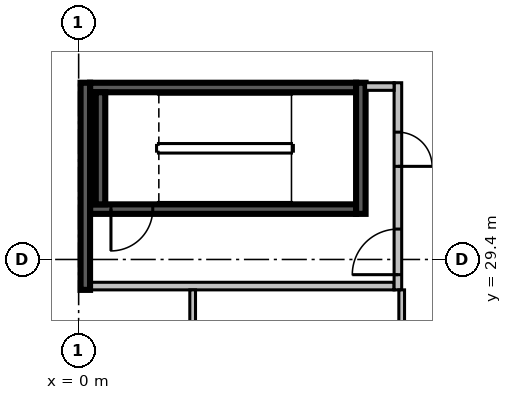
"""IFC4 building model, lengths in metres.
Left out: names, types, materials, properties, quantities, classifications, styles, units other than length and angle.
Written with IfcOpenShell. Run it as: python <this file> out.ifc"""

import sys

from ifc_helpers import new_model, si_unit, direction, frame, frame_2d, origin, place, context, subcontext, project, spatial, rectangle, extrude, source, transform, mapped, element, fill, save


model = new_model("IFC4")
c1 = context("Model", 3, precision=1e-05, world=origin(), true_north=direction((0.0, 1.0)))
c2 = subcontext(c1, "Body", "Model", "MODEL_VIEW")
j1 = project(units=[si_unit("LENGTHUNIT", "METRE"), si_unit("PLANEANGLEUNIT", "RADIAN")], contexts=[c1])
p1 = place(None, origin())
s1 = spatial("IfcSite", under=j1, at=p1, CompositionType="ELEMENT")
p2 = place(p1, origin())
s2 = spatial("IfcBuilding", under=s1, at=p2, CompositionType="ELEMENT")
p3 = place(p2, frame((0.0, 0.0, 23.7)))
s3 = spatial("IfcBuildingStorey", under=s2, at=p3, CompositionType="ELEMENT", Elevation=23.7)
m1 = source(origin(), c2, "Body", "SweptSolid", [
    extrude(rectangle(XDim=7.0, YDim=0.25, at=frame_2d((3.5, 0.0))), origin(), (0.0, 0.0, 1.0), 4.8),
])
p4 = place(p3, frame((0.3, 30.725, 0.0), z_axis=(0.0, 0.0, 1.0), x_axis=(1.0, 0.0, 0.0)))
e1 = element("IfcWall", 1, at=p4, inside=s3, PredefinedType="SOLIDWALL", context=c2, shape_type="MappedRepresentation", body=[
    mapped(m1, transform((0.0, 0.0, 0.0), scale=1.0)),
])
m2 = source(origin(), c2, "Body", "SweptSolid", [
    extrude(rectangle(XDim=1.1, YDim=2.1, at=frame_2d((0.55, 1.05))), frame((0.0, 0.135, 0.0), z_axis=(0.0, -1.0, 0.0), x_axis=(1.0, 0.0, 0.0)), (0.0, 0.0, 1.0), 0.27),
])
p5 = place(p4, frame((0.55, 0.0, 0.0)))
e2 = element("IfcOpeningElement", 2, at=p5, cuts=e1, PredefinedType="OPENING", context=c2, shape_type="MappedRepresentation", body=[
    mapped(m2, transform((0.0, 0.0, 0.0), scale=1.0)),
])
p6 = place(p3, frame((0.3, 33.925, 0.0), z_axis=(0.0, 0.0, 1.0), x_axis=(1.0, 0.0, 0.0)))
e3 = element("IfcWall", 3, at=p6, inside=s3, PredefinedType="SOLIDWALL", context=c2, shape_type="MappedRepresentation", body=[
    mapped(m1, transform((0.0, 0.0, 0.0), scale=1.0)),
])
m3 = source(origin(), c2, "Body", "SweptSolid", [
    extrude(rectangle(XDim=3.45, YDim=0.25, at=frame_2d((1.725, 0.0))), origin(), (0.0, 0.0, 1.0), 4.8),
])
p7 = place(p3, frame((7.425, 30.6, 0.0), z_axis=(0.0, 0.0, 1.0), x_axis=(0.0, 1.0, 0.0)))
e4 = element("IfcWall", 4, at=p7, inside=s3, PredefinedType="SOLIDWALL", context=c2, shape_type="MappedRepresentation", body=[
    mapped(m3, transform((0.0, 0.0, 0.0), scale=1.0)),
])
m4 = source(origin(), c2, "Body", "SweptSolid", [
    extrude(rectangle(XDim=2.95, YDim=0.25, at=frame_2d((1.475, 0.0))), origin(), (0.0, 0.0, 1.0), 4.8),
])
p8 = place(p3, frame((0.575, 30.85, 0.0), z_axis=(0.0, 0.0, 1.0), x_axis=(0.0, 1.0, 0.0)))
e5 = element("IfcWall", 5, at=p8, inside=s3, PredefinedType="SOLIDWALL", context=c2, shape_type="MappedRepresentation", body=[
    mapped(m4, transform((0.0, 0.0, 0.0), scale=1.0)),
])
m5 = source(origin(), c2, "Body", "SweptSolid", [
    extrude(rectangle(XDim=8.0, YDim=0.2, at=frame_2d((4.0, 0.0))), origin(), (0.0, 0.0, 1.0), 4.8),
])
p9 = place(p3, frame((0.3, 28.7, 0.0), z_axis=(0.0, 0.0, 1.0), x_axis=(1.0, 0.0, 0.0)))
e6 = element("IfcWall", 6, at=p9, inside=s3, PredefinedType="PARTITIONING", context=c2, shape_type="MappedRepresentation", body=[
    mapped(m5, transform((0.0, 0.0, 0.0), scale=1.0)),
])
m6 = source(origin(), c2, "Body", "SweptSolid", [
    extrude(rectangle(XDim=5.45, YDim=0.2, at=frame_2d((2.725, 0.0))), origin(), (0.0, 0.0, 1.0), 4.8),
])
p10 = place(p3, frame((8.4, 28.6, 0.0), z_axis=(0.0, 0.0, 1.0), x_axis=(0.0, 1.0, 0.0)))
e7 = element("IfcWall", 7, at=p10, inside=s3, PredefinedType="PARTITIONING", context=c2, shape_type="MappedRepresentation", body=[
    mapped(m6, transform((0.0, 0.0, 0.0), scale=1.0)),
])
m7 = source(origin(), c2, "Body", "SweptSolid", [
    extrude(rectangle(XDim=1.2, YDim=2.1, at=frame_2d((0.6, 1.05))), frame((0.0, 0.11, 0.0), z_axis=(0.0, -1.0, 0.0), x_axis=(1.0, 0.0, 0.0)), (0.0, 0.0, 1.0), 0.22),
])
p11 = place(p10, frame((0.4, 0.0, 0.0)))
e8 = element("IfcOpeningElement", 8, at=p11, cuts=e7, PredefinedType="OPENING", context=c2, shape_type="MappedRepresentation", body=[
    mapped(m7, transform((0.0, 0.0, 0.0), scale=1.0)),
])
m8 = source(origin(), c2, "Body", "SweptSolid", [
    extrude(rectangle(XDim=0.9, YDim=2.1, at=frame_2d((0.45, 1.05))), frame((0.0, 0.11, 0.0), z_axis=(0.0, -1.0, 0.0), x_axis=(1.0, 0.0, 0.0)), (0.0, 0.0, 1.0), 0.22),
])
p12 = place(p10, frame((3.25, 0.0, 0.0)))
e9 = element("IfcOpeningElement", 9, at=p12, cuts=e7, PredefinedType="OPENING", context=c2, shape_type="MappedRepresentation", body=[
    mapped(m8, transform((0.0, 0.0, 0.0), scale=1.0)),
])
m9 = source(origin(), c2, "Body", "SweptSolid", [
    extrude(rectangle(XDim=0.75, YDim=0.2, at=frame_2d((0.375, 0.0))), origin(), (0.0, 0.0, 1.0), 4.8),
])
p13 = place(p3, frame((7.55, 33.95, 0.0), z_axis=(0.0, 0.0, 1.0), x_axis=(1.0, 0.0, 0.0)))
e10 = element("IfcWall", 10, at=p13, inside=s3, PredefinedType="PARTITIONING", context=c2, shape_type="MappedRepresentation", body=[
    mapped(m9, transform((0.0, 0.0, 0.0), scale=1.0)),
])
m10 = source(origin(), c2, "Body", "SweptSolid", [
    extrude(rectangle(XDim=5.45, YDim=0.25, at=frame_2d((2.725, 0.0))), origin(), (0.0, 0.0, 1.0), 4.8),
])
p14 = place(p3, frame((0.175, 28.6, 0.0), z_axis=(0.0, 0.0, 1.0), x_axis=(0.0, 1.0, 0.0)))
e11 = element("IfcWall", 11, at=p14, inside=s3, PredefinedType="SOLIDWALL", context=c2, shape_type="MappedRepresentation", body=[
    mapped(m10, transform((0.0, 0.0, 0.0), scale=1.0)),
])
m11 = source(origin(), c2, "Body", "SweptSolid", [
    extrude(rectangle(XDim=6.4, YDim=0.15, at=frame_2d((3.2, 0.0))), origin(), (0.0, 0.0, 1.0), 4.8),
])
p15 = place(p3, frame((3.0, 22.2, 0.0), z_axis=(0.0, 0.0, 1.0), x_axis=(0.0, 1.0, 0.0)))
e12 = element("IfcWall", 12, at=p15, inside=s3, PredefinedType="PARTITIONING", context=c2, shape_type="MappedRepresentation", body=[
    mapped(m11, transform((0.0, 0.0, 0.0), scale=1.0)),
])
p16 = place(p3, frame((8.5, 22.2, 0.0), z_axis=(0.0, 0.0, 1.0), x_axis=(0.0, 1.0, 0.0)))
e13 = element("IfcWall", 13, at=p16, inside=s3, PredefinedType="PARTITIONING", context=c2, shape_type="MappedRepresentation", body=[
    mapped(m11, transform((0.0, 0.0, 0.0), scale=1.0)),
])
m12 = source(origin(), c2, "Body", "SweptSolid", [
    extrude(rectangle(XDim=0.9, YDim=2.1, at=frame_2d((0.45, 1.05))), frame((0.0, 0.085, 0.0), z_axis=(0.0, -1.0, 0.0), x_axis=(1.0, 0.0, 0.0)), (0.0, 0.0, 1.0), 0.17),
])
p17 = place(p16, frame((2.75, 0.0, 0.0)))
e14 = element("IfcOpeningElement", 14, at=p17, cuts=e13, PredefinedType="OPENING", context=c2, shape_type="MappedRepresentation", body=[
    mapped(m12, transform((0.0, 0.0, 0.0), scale=1.0)),
])
m13 = source(origin(), c2, "Body", "SweptSolid", [
    extrude(rectangle(XDim=1.1, YDim=2.1, at=frame_2d((0.55, 1.05))), frame((0.0, 0.025, 0.0), z_axis=(0.0, -1.0, 0.0), x_axis=(1.0, 0.0, 0.0)), (0.0, 0.0, 1.0), 0.05),
])
p18 = place(p5, origin())
e15 = element("IfcDoor", 15, at=p18, inside=s3, OperationType="SINGLE_SWING_RIGHT", PredefinedType="DOOR", context=c2, shape_type="MappedRepresentation", body=[
    mapped(m13, transform((0.0, 0.0, 0.0), scale=1.0)),
])
fill(e2, e15)
m14 = source(origin(), c2, "Body", "SweptSolid", [
    extrude(rectangle(XDim=1.2, YDim=2.1, at=frame_2d((0.6, 1.05))), frame((0.0, 0.025, 0.0), z_axis=(0.0, -1.0, 0.0), x_axis=(1.0, 0.0, 0.0)), (0.0, 0.0, 1.0), 0.05),
])
p19 = place(p11, origin())
e16 = element("IfcDoor", 16, at=p19, inside=s3, OperationType="SINGLE_SWING_LEFT", PredefinedType="DOOR", context=c2, shape_type="MappedRepresentation", body=[
    mapped(m14, transform((0.0, 0.0, 0.0), scale=1.0)),
])
fill(e8, e16)
m15 = source(origin(), c2, "Body", "SweptSolid", [
    extrude(rectangle(XDim=0.9, YDim=2.1, at=frame_2d((0.45, 1.05))), frame((0.0, 0.025, 0.0), z_axis=(0.0, -1.0, 0.0), x_axis=(1.0, 0.0, 0.0)), (0.0, 0.0, 1.0), 0.05),
])
p20 = place(p12, origin())
e17 = element("IfcDoor", 17, at=p20, inside=s3, OperationType="SINGLE_SWING_RIGHT", PredefinedType="DOOR", context=c2, shape_type="MappedRepresentation", body=[
    mapped(m15, transform((0.0, 0.0, 0.0), scale=1.0)),
])
fill(e9, e17)
save(model, sys.argv[1])
